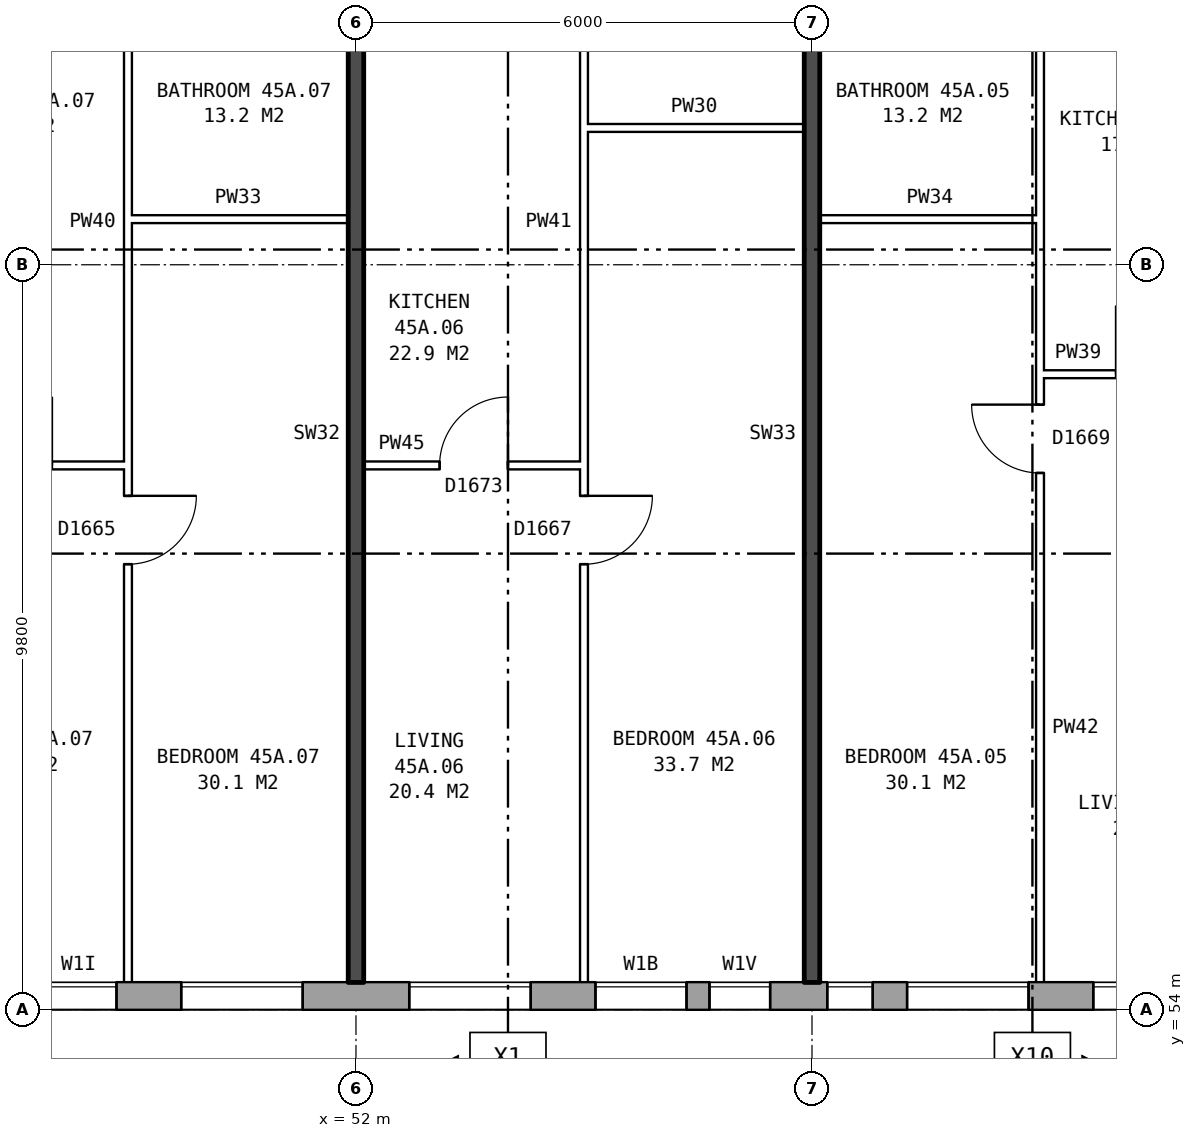
"""IFC4 building model, lengths in metres.
Left out: names, types, materials, properties, quantities, classifications, styles, units other than length and angle.
Written with IfcOpenShell. Run it as: python <this file> out.ifc"""

import sys

from ifc_helpers import new_model, si_unit, direction, frame, frame_2d, origin, place, context, subcontext, project, spatial, rectangle, extrude, element, fill, save


model = new_model("IFC4")
c1 = context("Model", 3, precision=1e-05, world=origin(), true_north=direction((0.0, 1.0)))
c2 = subcontext(c1, "Body", "Model", "MODEL_VIEW")
j1 = project(units=[si_unit("LENGTHUNIT", "METRE"), si_unit("PLANEANGLEUNIT", "RADIAN")], contexts=[c1])
p1 = place(None, origin())
s1 = spatial("IfcSite", under=j1, at=p1, CompositionType="ELEMENT")
p2 = place(p1, origin())
s2 = spatial("IfcBuilding", under=s1, at=p2, CompositionType="ELEMENT")
p3 = place(p2, frame((0.0, 0.0, 160.9)))
s3 = spatial("IfcBuildingStorey", under=s2, at=p3, CompositionType="ELEMENT", Elevation=160.9)
p4 = place(p3, frame((31.575, 54.18, 0.0), z_axis=(0.0, 0.0, 1.0), x_axis=(1.0, 0.0, 0.0)))
e1 = element("IfcWall", 1, at=p4, inside=s3, PredefinedType="STANDARD", context=c2, shape_type="SweptSolid", body=[
    extrude(rectangle(XDim=41.351, YDim=0.36, at=frame_2d((20.675, 0.0))), origin(), (0.0, 0.0, 1.0), 2.85),
])
p5 = place(p4, frame((3.125, 0.0, 0.8)))
e2 = element("IfcOpeningElement", 2, at=p5, cuts=e1, PredefinedType="OPENING", context=c2, shape_type="SweptSolid", body=[
    extrude(rectangle(XDim=1.6, YDim=1.8, at=frame_2d((0.8, 0.9))), frame((0.0, 0.19, 0.0), z_axis=(0.0, -1.0, 0.0), x_axis=(1.0, 0.0, 0.0)), (0.0, 0.0, 1.0), 0.38),
])
p6 = place(p4, frame((6.125, 0.0, 0.8)))
e3 = element("IfcOpeningElement", 3, at=p6, cuts=e1, PredefinedType="OPENING", context=c2, shape_type="SweptSolid", body=[
    extrude(rectangle(XDim=1.6, YDim=1.8, at=frame_2d((0.8, 0.9))), frame((0.0, 0.19, 0.0), z_axis=(0.0, -1.0, 0.0), x_axis=(1.0, 0.0, 0.0)), (0.0, 0.0, 1.0), 0.38),
])
p7 = place(p4, frame((9.125, 0.0, 0.8)))
e4 = element("IfcOpeningElement", 4, at=p7, cuts=e1, PredefinedType="OPENING", context=c2, shape_type="SweptSolid", body=[
    extrude(rectangle(XDim=1.6, YDim=1.8, at=frame_2d((0.8, 0.9))), frame((0.0, 0.19, 0.0), z_axis=(0.0, -1.0, 0.0), x_axis=(1.0, 0.0, 0.0)), (0.0, 0.0, 1.0), 0.38),
])
p8 = place(p4, frame((12.125, 0.0, 0.8)))
e5 = element("IfcOpeningElement", 5, at=p8, cuts=e1, PredefinedType="OPENING", context=c2, shape_type="SweptSolid", body=[
    extrude(rectangle(XDim=1.6, YDim=1.8, at=frame_2d((0.8, 0.9))), frame((0.0, 0.19, 0.0), z_axis=(0.0, -1.0, 0.0), x_axis=(1.0, 0.0, 0.0)), (0.0, 0.0, 1.0), 0.38),
])
p9 = place(p4, frame((15.375, 0.0, 0.25)))
e6 = element("IfcOpeningElement", 6, at=p9, cuts=e1, PredefinedType="OPENING", context=c2, shape_type="SweptSolid", body=[
    extrude(rectangle(XDim=0.6, YDim=0.9, at=frame_2d((0.3, 0.45))), frame((0.0, 0.19, 0.0), z_axis=(0.0, -1.0, 0.0), x_axis=(1.0, 0.0, 0.0)), (0.0, 0.0, 1.0), 0.38),
])
p10 = place(p4, frame((18.125, 0.0, 0.8)))
e7 = element("IfcOpeningElement", 7, at=p10, cuts=e1, PredefinedType="OPENING", context=c2, shape_type="SweptSolid", body=[
    extrude(rectangle(XDim=1.6, YDim=1.8, at=frame_2d((0.8, 0.9))), frame((0.0, 0.19, 0.0), z_axis=(0.0, -1.0, 0.0), x_axis=(1.0, 0.0, 0.0)), (0.0, 0.0, 1.0), 0.38),
])
p11 = place(p4, frame((21.125, 0.0, 0.8)))
e8 = element("IfcOpeningElement", 8, at=p11, cuts=e1, PredefinedType="OPENING", context=c2, shape_type="SweptSolid", body=[
    extrude(rectangle(XDim=1.6, YDim=1.8, at=frame_2d((0.8, 0.9))), frame((0.0, 0.19, 0.0), z_axis=(0.0, -1.0, 0.0), x_axis=(1.0, 0.0, 0.0)), (0.0, 0.0, 1.0), 0.38),
])
p12 = place(p4, frame((23.575, 0.0, 0.25)))
e9 = element("IfcOpeningElement", 9, at=p12, cuts=e1, PredefinedType="OPENING", context=c2, shape_type="SweptSolid", body=[
    extrude(rectangle(XDim=1.2, YDim=1.8, at=frame_2d((0.6, 0.9))), frame((0.0, 0.19, 0.0), z_axis=(0.0, -1.0, 0.0), x_axis=(1.0, 0.0, 0.0)), (0.0, 0.0, 1.0), 0.38),
])
p13 = place(p4, frame((26.625, 0.0, 1.7)))
e10 = element("IfcOpeningElement", 10, at=p13, cuts=e1, PredefinedType="OPENING", context=c2, shape_type="SweptSolid", body=[
    extrude(rectangle(XDim=0.6, YDim=0.9, at=frame_2d((0.3, 0.45))), frame((0.0, 0.19, 0.0), z_axis=(0.0, -1.0, 0.0), x_axis=(1.0, 0.0, 0.0)), (0.0, 0.0, 1.0), 0.38),
])
p14 = place(p4, frame((30.125, 0.0, 0.8)))
e11 = element("IfcOpeningElement", 11, at=p14, cuts=e1, PredefinedType="OPENING", context=c2, shape_type="SweptSolid", body=[
    extrude(rectangle(XDim=1.6, YDim=1.8, at=frame_2d((0.8, 0.9))), frame((0.0, 0.19, 0.0), z_axis=(0.0, -1.0, 0.0), x_axis=(1.0, 0.0, 0.0)), (0.0, 0.0, 1.0), 0.38),
])
p15 = place(p4, frame((33.125, 0.0, 0.8)))
e12 = element("IfcOpeningElement", 12, at=p15, cuts=e1, PredefinedType="OPENING", context=c2, shape_type="SweptSolid", body=[
    extrude(rectangle(XDim=1.6, YDim=1.8, at=frame_2d((0.8, 0.9))), frame((0.0, 0.19, 0.0), z_axis=(0.0, -1.0, 0.0), x_axis=(1.0, 0.0, 0.0)), (0.0, 0.0, 1.0), 0.38),
])
p16 = place(p4, frame((36.125, 0.0, 0.8)))
e13 = element("IfcOpeningElement", 13, at=p16, cuts=e1, PredefinedType="OPENING", context=c2, shape_type="SweptSolid", body=[
    extrude(rectangle(XDim=1.6, YDim=1.8, at=frame_2d((0.8, 0.9))), frame((0.0, 0.19, 0.0), z_axis=(0.0, -1.0, 0.0), x_axis=(1.0, 0.0, 0.0)), (0.0, 0.0, 1.0), 0.38),
])
p17 = place(p4, frame((39.125, 0.0, 0.8)))
e14 = element("IfcOpeningElement", 14, at=p17, cuts=e1, PredefinedType="OPENING", context=c2, shape_type="SweptSolid", body=[
    extrude(rectangle(XDim=1.6, YDim=1.8, at=frame_2d((0.8, 0.9))), frame((0.0, 0.19, 0.0), z_axis=(0.0, -1.0, 0.0), x_axis=(1.0, 0.0, 0.0)), (0.0, 0.0, 1.0), 0.38),
])
p18 = place(p4, frame((16.275, 0.0, 0.35)))
e15 = element("IfcOpeningElement", 15, at=p18, cuts=e1, PredefinedType="OPENING", context=c2, shape_type="SweptSolid", body=[
    extrude(rectangle(XDim=1.0, YDim=1.5, at=frame_2d((0.5, 0.75))), frame((0.0, 0.19, 0.0), z_axis=(0.0, -1.0, 0.0), x_axis=(1.0, 0.0, 0.0)), (0.0, 0.0, 1.0), 0.38),
])
p19 = place(p4, frame((25.075, 0.0, 0.25)))
e16 = element("IfcOpeningElement", 16, at=p19, cuts=e1, PredefinedType="OPENING", context=c2, shape_type="SweptSolid", body=[
    extrude(rectangle(XDim=0.8, YDim=0.9, at=frame_2d((0.4, 0.45))), frame((0.0, 0.19, 0.0), z_axis=(0.0, -1.0, 0.0), x_axis=(1.0, 0.0, 0.0)), (0.0, 0.0, 1.0), 0.38),
])
p20 = place(p4, frame((27.675, 0.0, 0.8)))
e17 = element("IfcOpeningElement", 17, at=p20, cuts=e1, PredefinedType="OPENING", context=c2, shape_type="SweptSolid", body=[
    extrude(rectangle(XDim=1.6, YDim=1.8, at=frame_2d((0.8, 0.9))), frame((0.0, 0.19, 0.0), z_axis=(0.0, -1.0, 0.0), x_axis=(1.0, 0.0, 0.0)), (0.0, 0.0, 1.0), 0.38),
])
p21 = place(p3, frame((46.1, 61.16, 0.0), z_axis=(0.0, 0.0, 1.0), x_axis=(1.0, 0.0, 0.0)))
e18 = element("IfcWall", 18, at=p21, inside=s3, PredefinedType="PARTITIONING", context=c2, shape_type="SweptSolid", body=[
    extrude(rectangle(XDim=2.9, YDim=0.1, at=frame_2d((1.45, 0.0))), origin(), (0.0, 0.0, 1.0), 2.85),
])
p22 = place(p21, frame((1.0, 0.0, 0.0)))
e19 = element("IfcOpeningElement", 19, at=p22, cuts=e18, PredefinedType="OPENING", context=c2, shape_type="SweptSolid", body=[
    extrude(rectangle(XDim=0.9, YDim=2.1, at=frame_2d((0.45, 1.05))), frame((0.0, 0.06, 0.0), z_axis=(0.0, -1.0, 0.0), x_axis=(1.0, 0.0, 0.0)), (0.0, 0.0, 1.0), 0.12),
])
p23 = place(p3, frame((52.1, 61.16, 0.0), z_axis=(0.0, 0.0, 1.0), x_axis=(1.0, 0.0, 0.0)))
e20 = element("IfcWall", 20, at=p23, inside=s3, PredefinedType="PARTITIONING", context=c2, shape_type="SweptSolid", body=[
    extrude(rectangle(XDim=2.9, YDim=0.1, at=frame_2d((1.45, 0.0))), origin(), (0.0, 0.0, 1.0), 2.85),
])
p24 = place(p23, frame((1.0, 0.0, 0.0)))
e21 = element("IfcOpeningElement", 21, at=p24, cuts=e20, PredefinedType="OPENING", context=c2, shape_type="SweptSolid", body=[
    extrude(rectangle(XDim=0.9, YDim=2.1, at=frame_2d((0.45, 1.05))), frame((0.0, 0.06, 0.0), z_axis=(0.0, -1.0, 0.0), x_axis=(1.0, 0.0, 0.0)), (0.0, 0.0, 1.0), 0.12),
])
p25 = place(p3, frame((61.0, 62.36, 0.0), z_axis=(0.0, 0.0, 1.0), x_axis=(1.0, 0.0, 0.0)))
e22 = element("IfcWall", 22, at=p25, inside=s3, PredefinedType="PARTITIONING", context=c2, shape_type="SweptSolid", body=[
    extrude(rectangle(XDim=2.9, YDim=0.1, at=frame_2d((1.45, 0.0))), origin(), (0.0, 0.0, 1.0), 2.85),
])
p26 = place(p25, frame((1.0, 0.0, 0.0)))
e23 = element("IfcOpeningElement", 23, at=p26, cuts=e22, PredefinedType="OPENING", context=c2, shape_type="SweptSolid", body=[
    extrude(rectangle(XDim=0.9, YDim=2.1, at=frame_2d((0.45, 1.05))), frame((0.0, 0.06, 0.0), z_axis=(0.0, -1.0, 0.0), x_axis=(1.0, 0.0, 0.0)), (0.0, 0.0, 1.0), 0.12),
])
for number, where, z_axis, x_axis in (
    (24, (49.0, 64.4, 0.0), (0.0, 0.0, 1.0), (1.0, 0.0, 0.0)),
    (25, (58.1, 64.4, 0.0), (0.0, 0.0, 1.0), (1.0, 0.0, 0.0)),
    (26, (55.0, 65.6, 0.0), (0.0, 0.0, 1.0), (1.0, 0.0, 0.0)),
):
    element("IfcWall", number, at=place(p3, frame(where, z_axis=z_axis, x_axis=x_axis)), inside=s3, PredefinedType="PARTITIONING", context=c2, shape_type="SweptSolid", body=[
        extrude(rectangle(XDim=2.9, YDim=0.1, at=frame_2d((1.45, 0.0))), origin(), (0.0, 0.0, 1.0), 2.85),
    ])
p27 = place(p3, frame((49.0, 54.36, 0.0), z_axis=(0.0, 0.0, 1.0), x_axis=(0.0, 1.0, 0.0)))
e27 = element("IfcWall", 27, at=p27, inside=s3, PredefinedType="PARTITIONING", context=c2, shape_type="SweptSolid", body=[
    extrude(rectangle(XDim=14.34, YDim=0.1, at=frame_2d((7.17, 0.0))), origin(), (0.0, 0.0, 1.0), 2.85),
])
p28 = place(p27, frame((5.5, 0.0, 0.0)))
e28 = element("IfcOpeningElement", 28, at=p28, cuts=e27, PredefinedType="OPENING", context=c2, shape_type="SweptSolid", body=[
    extrude(rectangle(XDim=0.9, YDim=2.1, at=frame_2d((0.45, 1.05))), frame((0.0, 0.06, 0.0), z_axis=(0.0, -1.0, 0.0), x_axis=(1.0, 0.0, 0.0)), (0.0, 0.0, 1.0), 0.12),
])
p29 = place(p27, frame((13.04, 0.0, 0.0)))
e29 = element("IfcOpeningElement", 29, at=p29, cuts=e27, PredefinedType="OPENING", context=c2, shape_type="SweptSolid", body=[
    extrude(rectangle(XDim=0.9, YDim=2.1, at=frame_2d((0.45, 1.05))), frame((0.0, 0.06, 0.0), z_axis=(0.0, -1.0, 0.0), x_axis=(1.0, 0.0, 0.0)), (0.0, 0.0, 1.0), 0.12),
])
p30 = place(p3, frame((52.0, 54.36, 0.0), z_axis=(0.0, 0.0, 1.0), x_axis=(0.0, 1.0, 0.0)))
e30 = element("IfcWall", 30, at=p30, inside=s3, PredefinedType="SOLIDWALL", context=c2, shape_type="SweptSolid", body=[
    extrude(rectangle(XDim=14.44, YDim=0.2, at=frame_2d((7.22, 0.0))), origin(), (0.0, 0.0, 1.0), 2.85),
])
p31 = place(p3, frame((55.0, 54.36, 0.0), z_axis=(0.0, 0.0, 1.0), x_axis=(0.0, 1.0, 0.0)))
e31 = element("IfcWall", 31, at=p31, inside=s3, PredefinedType="PARTITIONING", context=c2, shape_type="SweptSolid", body=[
    extrude(rectangle(XDim=14.34, YDim=0.1, at=frame_2d((7.17, 0.0))), origin(), (0.0, 0.0, 1.0), 2.85),
])
p32 = place(p31, frame((5.5, 0.0, 0.0)))
e32 = element("IfcOpeningElement", 32, at=p32, cuts=e31, PredefinedType="OPENING", context=c2, shape_type="SweptSolid", body=[
    extrude(rectangle(XDim=0.9, YDim=2.1, at=frame_2d((0.45, 1.05))), frame((0.0, 0.06, 0.0), z_axis=(0.0, -1.0, 0.0), x_axis=(1.0, 0.0, 0.0)), (0.0, 0.0, 1.0), 0.12),
])
p33 = place(p31, frame((13.04, 0.0, 0.0)))
e33 = element("IfcOpeningElement", 33, at=p33, cuts=e31, PredefinedType="OPENING", context=c2, shape_type="SweptSolid", body=[
    extrude(rectangle(XDim=0.9, YDim=2.1, at=frame_2d((0.45, 1.05))), frame((0.0, 0.06, 0.0), z_axis=(0.0, -1.0, 0.0), x_axis=(1.0, 0.0, 0.0)), (0.0, 0.0, 1.0), 0.12),
])
p34 = place(p3, frame((58.0, 54.36, 0.0), z_axis=(0.0, 0.0, 1.0), x_axis=(0.0, 1.0, 0.0)))
e34 = element("IfcWall", 34, at=p34, inside=s3, PredefinedType="SOLIDWALL", context=c2, shape_type="SweptSolid", body=[
    extrude(rectangle(XDim=14.44, YDim=0.2, at=frame_2d((7.22, 0.0))), origin(), (0.0, 0.0, 1.0), 2.85),
])
p35 = place(p3, frame((61.0, 54.36, 0.0), z_axis=(0.0, 0.0, 1.0), x_axis=(0.0, 1.0, 0.0)))
e35 = element("IfcWall", 35, at=p35, inside=s3, PredefinedType="PARTITIONING", context=c2, shape_type="SweptSolid", body=[
    extrude(rectangle(XDim=14.34, YDim=0.1, at=frame_2d((7.17, 0.0))), origin(), (0.0, 0.0, 1.0), 2.85),
])
p36 = place(p35, frame((6.7, 0.0, 0.0)))
e36 = element("IfcOpeningElement", 36, at=p36, cuts=e35, PredefinedType="OPENING", context=c2, shape_type="SweptSolid", body=[
    extrude(rectangle(XDim=0.9, YDim=2.1, at=frame_2d((0.45, 1.05))), frame((0.0, 0.06, 0.0), z_axis=(0.0, -1.0, 0.0), x_axis=(1.0, 0.0, 0.0)), (0.0, 0.0, 1.0), 0.12),
])
p37 = place(p35, frame((12.54, 0.0, 0.0)))
e37 = element("IfcOpeningElement", 37, at=p37, cuts=e35, PredefinedType="OPENING", context=c2, shape_type="SweptSolid", body=[
    extrude(rectangle(XDim=0.9, YDim=2.1, at=frame_2d((0.45, 1.05))), frame((0.0, 0.06, 0.0), z_axis=(0.0, -1.0, 0.0), x_axis=(1.0, 0.0, 0.0)), (0.0, 0.0, 1.0), 0.12),
])
p38 = place(p10, origin())
e38 = element("IfcWindow", 38, at=p38, inside=s3, PartitioningType="SINGLE_PANEL", PredefinedType="WINDOW", context=c2, shape_type="SweptSolid", body=[
    extrude(rectangle(XDim=1.6, YDim=1.8, at=frame_2d((0.8, 0.9))), frame((0.0, 0.15, 0.0), z_axis=(0.0, -1.0, 0.0), x_axis=(1.0, 0.0, 0.0)), (0.0, 0.0, 1.0), 0.06),
])
fill(e7, e38)
p39 = place(p11, origin())
e39 = element("IfcWindow", 39, at=p39, inside=s3, PartitioningType="SINGLE_PANEL", PredefinedType="WINDOW", context=c2, shape_type="SweptSolid", body=[
    extrude(rectangle(XDim=1.6, YDim=1.8, at=frame_2d((0.8, 0.9))), frame((0.0, 0.15, 0.0), z_axis=(0.0, -1.0, 0.0), x_axis=(1.0, 0.0, 0.0)), (0.0, 0.0, 1.0), 0.06),
])
fill(e8, e39)
p40 = place(p12, origin())
e40 = element("IfcWindow", 40, at=p40, inside=s3, PartitioningType="SINGLE_PANEL", PredefinedType="WINDOW", context=c2, shape_type="SweptSolid", body=[
    extrude(rectangle(XDim=1.2, YDim=1.8, at=frame_2d((0.6, 0.9))), frame((0.0, 0.15, 0.0), z_axis=(0.0, -1.0, 0.0), x_axis=(1.0, 0.0, 0.0)), (0.0, 0.0, 1.0), 0.06),
])
fill(e9, e40)
p41 = place(p13, origin())
e41 = element("IfcWindow", 41, at=p41, inside=s3, PartitioningType="SINGLE_PANEL", PredefinedType="WINDOW", context=c2, shape_type="SweptSolid", body=[
    extrude(rectangle(XDim=0.6, YDim=0.9, at=frame_2d((0.3, 0.45))), frame((0.0, 0.15, 0.0), z_axis=(0.0, -1.0, 0.0), x_axis=(1.0, 0.0, 0.0)), (0.0, 0.0, 1.0), 0.06),
])
fill(e10, e41)
p42 = place(p14, origin())
e42 = element("IfcWindow", 42, at=p42, inside=s3, PartitioningType="SINGLE_PANEL", PredefinedType="WINDOW", context=c2, shape_type="SweptSolid", body=[
    extrude(rectangle(XDim=1.6, YDim=1.8, at=frame_2d((0.8, 0.9))), frame((0.0, 0.15, 0.0), z_axis=(0.0, -1.0, 0.0), x_axis=(1.0, 0.0, 0.0)), (0.0, 0.0, 1.0), 0.06),
])
fill(e11, e42)
p43 = place(p36, origin())
e43 = element("IfcDoor", 43, at=p43, inside=s3, OperationType="SINGLE_SWING_RIGHT", PredefinedType="DOOR", context=c2, shape_type="SweptSolid", body=[
    extrude(rectangle(XDim=0.9, YDim=2.1, at=frame_2d((0.45, 1.05))), frame((0.0, 0.025, 0.0), z_axis=(0.0, -1.0, 0.0), x_axis=(1.0, 0.0, 0.0)), (0.0, 0.0, 1.0), 0.05),
])
fill(e36, e43)
p44 = place(p32, frame((0.9, 0.0, 0.0), z_axis=(0.0, 0.0, 1.0), x_axis=(-1.0, 0.0, 0.0)))
e44 = element("IfcDoor", 44, at=p44, inside=s3, OperationType="SINGLE_SWING_LEFT", PredefinedType="DOOR", context=c2, shape_type="SweptSolid", body=[
    extrude(rectangle(XDim=0.9, YDim=2.1, at=frame_2d((0.45, 1.05))), frame((0.0, 0.025, 0.0), z_axis=(0.0, -1.0, 0.0), x_axis=(1.0, 0.0, 0.0)), (0.0, 0.0, 1.0), 0.05),
])
fill(e32, e44)
p45 = place(p24, origin())
e45 = element("IfcDoor", 45, at=p45, inside=s3, OperationType="SINGLE_SWING_RIGHT", PredefinedType="DOOR", context=c2, shape_type="SweptSolid", body=[
    extrude(rectangle(XDim=0.9, YDim=2.1, at=frame_2d((0.45, 1.05))), frame((0.0, 0.025, 0.0), z_axis=(0.0, -1.0, 0.0), x_axis=(1.0, 0.0, 0.0)), (0.0, 0.0, 1.0), 0.05),
])
fill(e21, e45)
p46 = place(p28, frame((0.9, 0.0, 0.0), z_axis=(0.0, 0.0, 1.0), x_axis=(-1.0, 0.0, 0.0)))
e46 = element("IfcDoor", 46, at=p46, inside=s3, OperationType="SINGLE_SWING_LEFT", PredefinedType="DOOR", context=c2, shape_type="SweptSolid", body=[
    extrude(rectangle(XDim=0.9, YDim=2.1, at=frame_2d((0.45, 1.05))), frame((0.0, 0.025, 0.0), z_axis=(0.0, -1.0, 0.0), x_axis=(1.0, 0.0, 0.0)), (0.0, 0.0, 1.0), 0.05),
])
fill(e28, e46)
p47 = place(p18, origin())
e47 = element("IfcWindow", 47, at=p47, inside=s3, PartitioningType="SINGLE_PANEL", PredefinedType="WINDOW", context=c2, shape_type="SweptSolid", body=[
    extrude(rectangle(XDim=1.0, YDim=1.5, at=frame_2d((0.5, 0.75))), frame((0.0, 0.15, 0.0), z_axis=(0.0, -1.0, 0.0), x_axis=(1.0, 0.0, 0.0)), (0.0, 0.0, 1.0), 0.06),
])
fill(e15, e47)
p48 = place(p19, origin())
e48 = element("IfcWindow", 48, at=p48, inside=s3, PartitioningType="SINGLE_PANEL", PredefinedType="WINDOW", context=c2, shape_type="SweptSolid", body=[
    extrude(rectangle(XDim=0.8, YDim=0.9, at=frame_2d((0.4, 0.45))), frame((0.0, 0.15, 0.0), z_axis=(0.0, -1.0, 0.0), x_axis=(1.0, 0.0, 0.0)), (0.0, 0.0, 1.0), 0.06),
])
fill(e16, e48)
p49 = place(p20, origin())
e49 = element("IfcWindow", 49, at=p49, inside=s3, PartitioningType="SINGLE_PANEL", PredefinedType="WINDOW", context=c2, shape_type="SweptSolid", body=[
    extrude(rectangle(XDim=1.6, YDim=1.8, at=frame_2d((0.8, 0.9))), frame((0.0, 0.15, 0.0), z_axis=(0.0, -1.0, 0.0), x_axis=(1.0, 0.0, 0.0)), (0.0, 0.0, 1.0), 0.06),
])
fill(e17, e49)
save(model, sys.argv[1])
